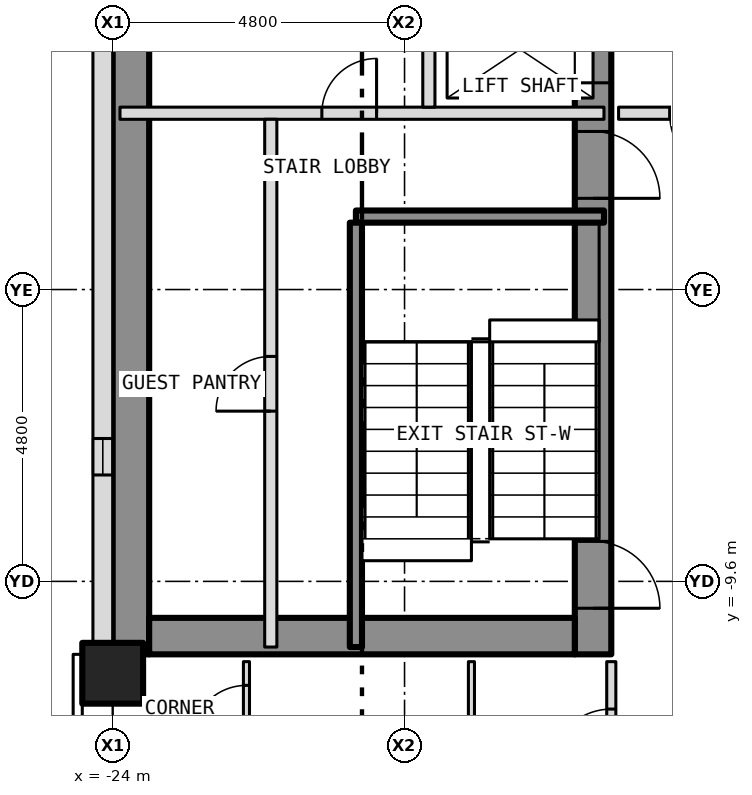
"""IFC4 building model, lengths in metres.
Left out: names, types, materials, properties, quantities, classifications, styles, units other than length and angle.
Written with IfcOpenShell. Run it as: python <this file> out.ifc"""

import sys

from ifc_helpers import new_model, si_unit, direction, frame, frame_2d, origin, origin_2d, place, context, subcontext, project, spatial, rectangle, hollow_rectangle, extrude, element, fill, save


model = new_model("IFC4")
c1 = context("Model", 3, precision=1e-05, world=origin(), true_north=direction((0.0, 1.0)))
c2 = subcontext(c1, "Body", "Model", "MODEL_VIEW")
j1 = project(units=[si_unit("LENGTHUNIT", "METRE"), si_unit("PLANEANGLEUNIT", "RADIAN")], contexts=[c1])
p1 = place(None, origin())
s1 = spatial("IfcSite", under=j1, at=p1, CompositionType="ELEMENT")
p2 = place(p1, origin())
s2 = spatial("IfcBuilding", under=s1, at=p2, CompositionType="ELEMENT")
p3 = place(p2, frame((0.0, 0.0, 56.5)))
s3 = spatial("IfcBuildingStorey", under=s2, at=p3, CompositionType="ELEMENT", Elevation=56.5)
p4 = place(p3, frame((-24.0, -11.111, -0.15), z_axis=(0.0, 0.0, 1.0), x_axis=(1.0, 0.0, 0.0)))
e1 = element("IfcColumn", 1, at=p4, inside=s3, PredefinedType="COLUMN", context=c2, shape_type="SweptSolid", body=[
    extrude(hollow_rectangle(XDim=1.0, YDim=1.0, WallThickness=0.06, at=origin_2d()), origin(), (0.0, 0.0, 1.0), 3.5),
])
p5 = place(p3, frame((-16.1, -10.8, 0.0), z_axis=(0.0, 0.0, 1.0), x_axis=(0.0, 1.0, 0.0)))
e2 = element("IfcWall", 2, at=p5, inside=s3, PredefinedType="SHEAR", context=c2, shape_type="SweptSolid", body=[
    extrude(rectangle(XDim=21.6, YDim=0.6, at=frame_2d((10.8, 0.0))), origin(), (0.0, 0.0, 1.0), 3.25),
])
p6 = place(p5, frame((9.4, 0.0, 0.0)))
e3 = element("IfcOpeningElement", 3, at=p6, cuts=e2, PredefinedType="OPENING", context=c2, shape_type="SweptSolid", body=[
    extrude(rectangle(XDim=1.1, YDim=2.1, at=frame_2d((0.55, 1.05))), frame((0.0, 0.312, 0.0), z_axis=(0.0, -1.0, 0.0), x_axis=(1.0, 0.0, 0.0)), (0.0, 0.0, 1.0), 0.624),
])
p7 = place(p5, frame((11.5, 0.0, 0.0)))
e4 = element("IfcOpeningElement", 4, at=p7, cuts=e2, PredefinedType="OPENING", context=c2, shape_type="SweptSolid", body=[
    extrude(rectangle(XDim=1.1, YDim=2.1, at=frame_2d((0.55, 1.05))), frame((0.0, 0.312, 0.0), z_axis=(0.0, -1.0, 0.0), x_axis=(1.0, 0.0, 0.0)), (0.0, 0.0, 1.0), 0.624),
])
p8 = place(p5, frame((13.6, 0.0, 0.0)))
e5 = element("IfcOpeningElement", 5, at=p8, cuts=e2, PredefinedType="OPENING", context=c2, shape_type="SweptSolid", body=[
    extrude(rectangle(XDim=1.1, YDim=2.1, at=frame_2d((0.55, 1.05))), frame((0.0, 0.312, 0.0), z_axis=(0.0, -1.0, 0.0), x_axis=(1.0, 0.0, 0.0)), (0.0, 0.0, 1.0), 0.624),
])
p9 = place(p5, frame((15.7, 0.0, 0.0)))
e6 = element("IfcOpeningElement", 6, at=p9, cuts=e2, PredefinedType="OPENING", context=c2, shape_type="SweptSolid", body=[
    extrude(rectangle(XDim=1.1, YDim=2.1, at=frame_2d((0.55, 1.05))), frame((0.0, 0.312, 0.0), z_axis=(0.0, -1.0, 0.0), x_axis=(1.0, 0.0, 0.0)), (0.0, 0.0, 1.0), 0.624),
])
p10 = place(p5, frame((17.8, 0.0, 0.0)))
e7 = element("IfcOpeningElement", 7, at=p10, cuts=e2, PredefinedType="OPENING", context=c2, shape_type="SweptSolid", body=[
    extrude(rectangle(XDim=1.1, YDim=2.1, at=frame_2d((0.55, 1.05))), frame((0.0, 0.312, 0.0), z_axis=(0.0, -1.0, 0.0), x_axis=(1.0, 0.0, 0.0)), (0.0, 0.0, 1.0), 0.624),
])
p11 = place(p5, frame((0.758, 0.0, 0.0)))
e8 = element("IfcOpeningElement", 8, at=p11, cuts=e2, PredefinedType="OPENING", context=c2, shape_type="SweptSolid", body=[
    extrude(rectangle(XDim=1.1, YDim=2.1, at=frame_2d((0.55, 1.05))), frame((0.0, 0.312, 0.0), z_axis=(0.0, -1.0, 0.0), x_axis=(1.0, 0.0, 0.0)), (0.0, 0.0, 1.0), 0.624),
])
p12 = place(p5, frame((7.5, 0.0, 0.0)))
e9 = element("IfcOpeningElement", 9, at=p12, cuts=e2, PredefinedType="OPENING", context=c2, shape_type="SweptSolid", body=[
    extrude(rectangle(XDim=1.1, YDim=2.1, at=frame_2d((0.55, 1.05))), frame((0.0, 0.312, 0.0), z_axis=(0.0, -1.0, 0.0), x_axis=(1.0, 0.0, 0.0)), (0.0, 0.0, 1.0), 0.624),
])
p13 = place(p3, frame((-23.7, -10.8, 0.0), z_axis=(0.0, 0.0, 1.0), x_axis=(0.0, 1.0, 0.0)))
e10 = element("IfcWall", 10, at=p13, inside=s3, PredefinedType="SHEAR", context=c2, shape_type="SweptSolid", body=[
    extrude(rectangle(XDim=21.6, YDim=0.6, at=frame_2d((10.8, 0.0))), origin(), (0.0, 0.0, 1.0), 3.25),
])
p14 = place(p3, frame((-23.4, -10.5, 0.0), z_axis=(0.0, 0.0, 1.0), x_axis=(1.0, 0.0, 0.0)))
e11 = element("IfcWall", 11, at=p14, inside=s3, PredefinedType="SHEAR", context=c2, shape_type="SweptSolid", body=[
    extrude(rectangle(XDim=7.0, YDim=0.6, at=frame_2d((3.5, 0.0))), origin(), (0.0, 0.0, 1.0), 3.25),
])
p15 = place(p3, frame((-24.163, 10.8, 0.0), z_axis=(0.0, 0.0, 1.0), x_axis=(0.0, -1.0, 0.0)))
e12 = element("IfcWall", 12, at=p15, inside=s3, PredefinedType="SOLIDWALL", context=c2, shape_type="SweptSolid", body=[
    extrude(rectangle(XDim=21.6, YDim=0.325, at=frame_2d((10.8, 0.0))), origin(), (0.0, 0.0, 1.0), 3.5),
])
p16 = place(p15, frame((18.05, 0.0, 1.0)))
e13 = element("IfcOpeningElement", 13, at=p16, cuts=e12, PredefinedType="OPENING", context=c2, shape_type="SweptSolid", body=[
    extrude(rectangle(XDim=0.6, YDim=1.5, at=frame_2d((0.3, 0.75))), frame((0.0, 0.175, 0.0), z_axis=(0.0, -1.0, 0.0), x_axis=(1.0, 0.0, 0.0)), (0.0, 0.0, 1.0), 0.349),
])
p17 = place(p3, frame((-20.0, -3.6, 0.0), z_axis=(0.0, 0.0, 1.0), x_axis=(1.0, 0.0, 0.0)))
e14 = element("IfcWall", 14, at=p17, inside=s3, PredefinedType="SHEAR", context=c2, shape_type="SweptSolid", body=[
    extrude(rectangle(XDim=4.08, YDim=0.2, at=frame_2d((2.04, 0.0))), origin(), (0.0, 0.0, 1.0), 3.25),
])
p18 = place(p3, frame((-23.88, -1.9, 0.0), z_axis=(0.0, 0.0, 1.0), x_axis=(1.0, 0.0, 0.0)))
e15 = element("IfcWall", 15, at=p18, inside=s3, PredefinedType="PARTITIONING", context=c2, shape_type="SweptSolid", body=[
    extrude(rectangle(XDim=7.96, YDim=0.2, at=frame_2d((3.98, 0.0))), origin(), (0.0, 0.0, 1.0), 3.25),
])
p19 = place(p18, frame((3.32, 0.0, 0.0)))
e16 = element("IfcOpeningElement", 16, at=p19, cuts=e15, PredefinedType="OPENING", context=c2, shape_type="SweptSolid", body=[
    extrude(rectangle(XDim=0.9, YDim=2.1, at=frame_2d((0.45, 1.05))), frame((0.0, 0.112, 0.0), z_axis=(0.0, -1.0, 0.0), x_axis=(1.0, 0.0, 0.0)), (0.0, 0.0, 1.0), 0.224),
])
p20 = place(p3, frame((-15.68, -1.9, 0.0), z_axis=(0.0, 0.0, 1.0), x_axis=(1.0, 0.0, 0.0)))
e17 = element("IfcWall", 17, at=p20, inside=s3, PredefinedType="PARTITIONING", context=c2, shape_type="SweptSolid", body=[
    extrude(rectangle(XDim=3.28, YDim=0.2, at=frame_2d((1.64, 0.0))), origin(), (0.0, 0.0, 1.0), 3.35),
])
p21 = place(p20, frame((0.84, 0.0, 0.0)))
e18 = element("IfcOpeningElement", 18, at=p21, cuts=e17, PredefinedType="OPENING", context=c2, shape_type="SweptSolid", body=[
    extrude(rectangle(XDim=1.1, YDim=2.1, at=frame_2d((0.55, 1.05))), frame((0.0, 0.112, 0.0), z_axis=(0.0, -1.0, 0.0), x_axis=(1.0, 0.0, 0.0)), (0.0, 0.0, 1.0), 0.224),
])
p22 = place(p3, frame((-21.8, -13.95, 0.0), z_axis=(0.0, 0.0, 1.0), x_axis=(0.0, 1.0, 0.0)))
e19 = element("IfcWall", 19, at=p22, inside=s3, PredefinedType="PARTITIONING", context=c2, shape_type="SweptSolid", body=[
    extrude(rectangle(XDim=3.03, YDim=0.1, at=frame_2d((1.515, 0.0))), origin(), (0.0, 0.0, 1.0), 3.35),
])
p23 = place(p22, frame((1.74, 0.0, 0.0)))
e20 = element("IfcOpeningElement", 20, at=p23, cuts=e19, PredefinedType="OPENING", context=c2, shape_type="SweptSolid", body=[
    extrude(rectangle(XDim=0.9, YDim=2.1, at=frame_2d((0.45, 1.05))), frame((0.0, 0.062, 0.0), z_axis=(0.0, -1.0, 0.0), x_axis=(1.0, 0.0, 0.0)), (0.0, 0.0, 1.0), 0.124),
])
p24 = place(p3, frame((-21.4, -10.68, 0.0), z_axis=(0.0, 0.0, 1.0), x_axis=(0.0, 1.0, 0.0)))
e21 = element("IfcWall", 21, at=p24, inside=s3, PredefinedType="PARTITIONING", context=c2, shape_type="SweptSolid", body=[
    extrude(rectangle(XDim=8.68, YDim=0.2, at=frame_2d((4.34, 0.0))), origin(), (0.0, 0.0, 1.0), 3.25),
])
p25 = place(p24, frame((3.88, 0.0, 0.0)))
e22 = element("IfcOpeningElement", 22, at=p25, cuts=e21, PredefinedType="OPENING", context=c2, shape_type="SweptSolid", body=[
    extrude(rectangle(XDim=0.9, YDim=2.1, at=frame_2d((0.45, 1.05))), frame((0.0, 0.112, 0.0), z_axis=(0.0, -1.0, 0.0), x_axis=(1.0, 0.0, 0.0)), (0.0, 0.0, 1.0), 0.224),
])
p26 = place(p3, frame((-20.0, -10.68, 0.0), z_axis=(0.0, 0.0, 1.0), x_axis=(0.0, 1.0, 0.0)))
e23 = element("IfcWall", 23, at=p26, inside=s3, PredefinedType="SHEAR", context=c2, shape_type="SweptSolid", body=[
    extrude(rectangle(XDim=6.98, YDim=0.2, at=frame_2d((3.49, 0.0))), origin(), (0.0, 0.0, 1.0), 3.25),
])
p27 = place(p3, frame((-18.8, -1.8, 0.0), z_axis=(0.0, 0.0, 1.0), x_axis=(0.0, 1.0, 0.0)))
e24 = element("IfcWall", 24, at=p27, inside=s3, PredefinedType="PARTITIONING", context=c2, shape_type="SweptSolid", body=[
    extrude(rectangle(XDim=6.15, YDim=0.2, at=frame_2d((3.075, 0.0))), origin(), (0.0, 0.0, 1.0), 3.25),
])
p28 = place(p3, frame((-18.1, -24.53, 0.0), z_axis=(0.0, 0.0, 1.0), x_axis=(0.0, 1.0, 0.0)))
e25 = element("IfcWall", 25, at=p28, inside=s3, PredefinedType="PARTITIONING", context=c2, shape_type="SweptSolid", body=[
    extrude(rectangle(XDim=13.61, YDim=0.1, at=frame_2d((6.805, 0.0))), origin(), (0.0, 0.0, 1.0), 3.35),
])
p29 = place(p28, frame((6.68, 0.0, 0.0)))
e26 = element("IfcOpeningElement", 26, at=p29, cuts=e25, PredefinedType="OPENING", context=c2, shape_type="SweptSolid", body=[
    extrude(rectangle(XDim=0.9, YDim=2.1, at=frame_2d((0.45, 1.05))), frame((0.0, 0.062, 0.0), z_axis=(0.0, -1.0, 0.0), x_axis=(1.0, 0.0, 0.0)), (0.0, 0.0, 1.0), 0.124),
])
p30 = place(p3, frame((-15.8, -15.725, 0.0), z_axis=(0.0, 0.0, 1.0), x_axis=(0.0, 1.0, 0.0)))
e27 = element("IfcWall", 27, at=p30, inside=s3, PredefinedType="PARTITIONING", context=c2, shape_type="SweptSolid", body=[
    extrude(rectangle(XDim=4.805, YDim=0.15, at=frame_2d((2.403, 0.0))), origin(), (0.0, 0.0, 1.0), 3.35),
])
p31 = place(p30, frame((3.025, 0.0, 0.0)))
e28 = element("IfcOpeningElement", 28, at=p31, cuts=e27, PredefinedType="OPENING", context=c2, shape_type="SweptSolid", body=[
    extrude(rectangle(XDim=1.0, YDim=2.1, at=frame_2d((0.5, 1.05))), frame((0.0, 0.087, 0.0), z_axis=(0.0, -1.0, 0.0), x_axis=(1.0, 0.0, 0.0)), (0.0, 0.0, 1.0), 0.174),
])
p32 = place(p16, origin())
e29 = element("IfcWindow", 29, at=p32, inside=s3, PartitioningType="SINGLE_PANEL", PredefinedType="WINDOW", context=c2, shape_type="SweptSolid", body=[
    extrude(rectangle(XDim=0.6, YDim=1.5, at=frame_2d((0.3, 0.75))), frame((0.0, -0.073, 0.0), z_axis=(0.0, -1.0, 0.0), x_axis=(1.0, 0.0, 0.0)), (0.0, 0.0, 1.0), 0.06),
])
fill(e13, e29)
p33 = place(p6, origin())
e30 = element("IfcDoor", 30, at=p33, inside=s3, OperationType="SLIDING_TO_LEFT", PredefinedType="DOOR", context=c2, shape_type="SweptSolid", body=[
    extrude(rectangle(XDim=1.1, YDim=2.1, at=frame_2d((0.55, 1.05))), frame((0.0, 0.025, 0.0), z_axis=(0.0, -1.0, 0.0), x_axis=(1.0, 0.0, 0.0)), (0.0, 0.0, 1.0), 0.05),
])
fill(e3, e30)
p34 = place(p11, origin())
e31 = element("IfcDoor", 31, at=p34, inside=s3, OperationType="SINGLE_SWING_LEFT", PredefinedType="DOOR", context=c2, shape_type="SweptSolid", body=[
    extrude(rectangle(XDim=1.1, YDim=2.1, at=frame_2d((0.55, 1.05))), frame((0.0, 0.025, 0.0), z_axis=(0.0, -1.0, 0.0), x_axis=(1.0, 0.0, 0.0)), (0.0, 0.0, 1.0), 0.05),
])
fill(e8, e31)
p35 = place(p12, origin())
e32 = element("IfcDoor", 32, at=p35, inside=s3, OperationType="SINGLE_SWING_LEFT", PredefinedType="DOOR", context=c2, shape_type="SweptSolid", body=[
    extrude(rectangle(XDim=1.1, YDim=2.1, at=frame_2d((0.55, 1.05))), frame((0.0, 0.025, 0.0), z_axis=(0.0, -1.0, 0.0), x_axis=(1.0, 0.0, 0.0)), (0.0, 0.0, 1.0), 0.05),
])
fill(e9, e32)
p36 = place(p25, origin())
e33 = element("IfcDoor", 33, at=p36, inside=s3, OperationType="SINGLE_SWING_LEFT", PredefinedType="DOOR", context=c2, shape_type="SweptSolid", body=[
    extrude(rectangle(XDim=0.9, YDim=2.1, at=frame_2d((0.45, 1.05))), frame((0.0, 0.025, 0.0), z_axis=(0.0, -1.0, 0.0), x_axis=(1.0, 0.0, 0.0)), (0.0, 0.0, 1.0), 0.05),
])
fill(e22, e33)
p37 = place(p19, origin())
e34 = element("IfcDoor", 34, at=p37, inside=s3, OperationType="SINGLE_SWING_RIGHT", PredefinedType="DOOR", context=c2, shape_type="SweptSolid", body=[
    extrude(rectangle(XDim=0.9, YDim=2.1, at=frame_2d((0.45, 1.05))), frame((0.0, 0.025, 0.0), z_axis=(0.0, -1.0, 0.0), x_axis=(1.0, 0.0, 0.0)), (0.0, 0.0, 1.0), 0.05),
])
fill(e16, e34)
p38 = place(p21, origin())
e35 = element("IfcDoor", 35, at=p38, inside=s3, OperationType="SINGLE_SWING_RIGHT", PredefinedType="DOOR", context=c2, shape_type="SweptSolid", body=[
    extrude(rectangle(XDim=1.1, YDim=2.1, at=frame_2d((0.55, 1.05))), frame((0.0, 0.025, 0.0), z_axis=(0.0, -1.0, 0.0), x_axis=(1.0, 0.0, 0.0)), (0.0, 0.0, 1.0), 0.05),
])
fill(e18, e35)
p39 = place(p31, origin())
e36 = element("IfcDoor", 36, at=p39, inside=s3, OperationType="SINGLE_SWING_LEFT", PredefinedType="DOOR", context=c2, shape_type="SweptSolid", body=[
    extrude(rectangle(XDim=1.0, YDim=2.1, at=frame_2d((0.5, 1.05))), frame((0.0, 0.025, 0.0), z_axis=(0.0, -1.0, 0.0), x_axis=(1.0, 0.0, 0.0)), (0.0, 0.0, 1.0), 0.05),
])
fill(e28, e36)
p40 = place(p23, origin())
e37 = element("IfcDoor", 37, at=p40, inside=s3, OperationType="SINGLE_SWING_LEFT", PredefinedType="DOOR", context=c2, shape_type="SweptSolid", body=[
    extrude(rectangle(XDim=0.9, YDim=2.1, at=frame_2d((0.45, 1.05))), frame((0.0, 0.025, 0.0), z_axis=(0.0, -1.0, 0.0), x_axis=(1.0, 0.0, 0.0)), (0.0, 0.0, 1.0), 0.05),
])
fill(e20, e37)
save(model, sys.argv[1])
